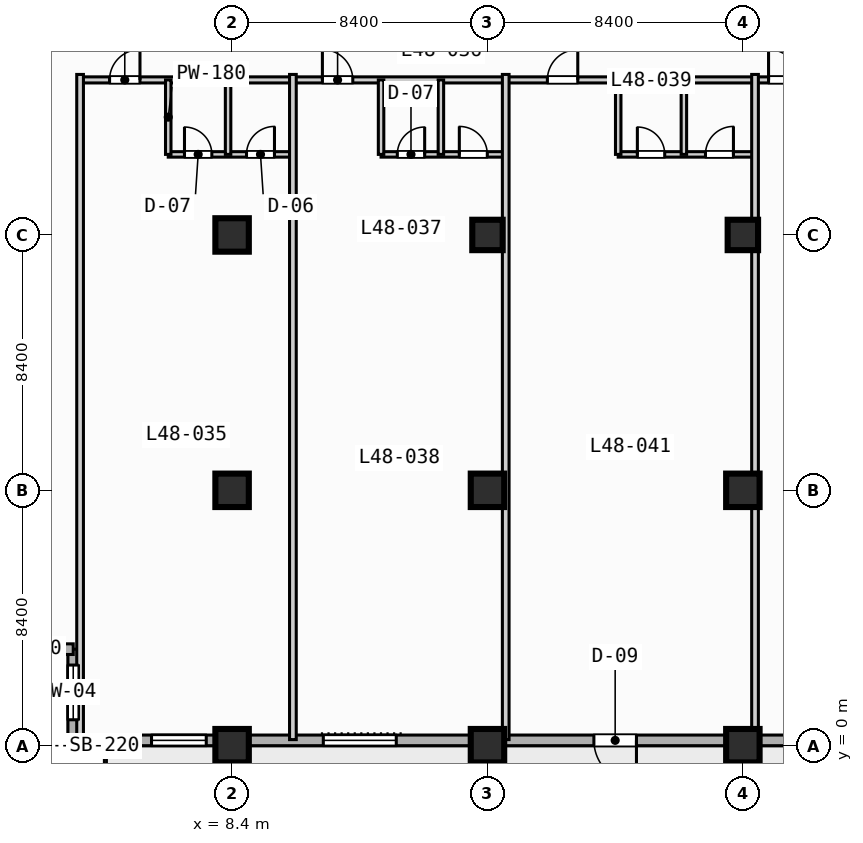
"""IFC4 building model, lengths in metres.
Left out: names, types, materials, properties, quantities, classifications, styles, units other than length and angle.
Written with IfcOpenShell. Run it as: python <this file> out.ifc"""

import sys

from ifc_helpers import new_model, si_unit, direction, frame, frame_2d, origin, origin_2d, place, context, subcontext, project, spatial, rectangle, extrude, element, fill, save


model = new_model("IFC4")
c1 = context("Model", 3, precision=1e-05, world=origin(), true_north=direction((0.0, 1.0)))
c2 = subcontext(c1, "Body", "Model", "MODEL_VIEW")
j1 = project(units=[si_unit("LENGTHUNIT", "METRE"), si_unit("PLANEANGLEUNIT", "RADIAN")], contexts=[c1])
p1 = place(None, origin())
s1 = spatial("IfcSite", under=j1, at=p1, CompositionType="ELEMENT")
p2 = place(p1, origin())
s2 = spatial("IfcBuilding", under=s1, at=p2, CompositionType="ELEMENT")
p3 = place(p2, frame((0.0, 0.0, 197.6)))
s3 = spatial("IfcBuildingStorey", under=s2, at=p3, CompositionType="ELEMENT", Elevation=197.6)
for number, where, z_axis, x_axis in (
    (1, (8.4, 0.0, 0.0), (0.0, 0.0, 1.0), (1.0, 0.0, 0.0)),
    (2, (8.4, 8.4, 0.0), (0.0, 0.0, 1.0), (1.0, 0.0, 0.0)),
    (3, (8.4, 16.8, 0.0), (0.0, 0.0, 1.0), (1.0, 0.0, 0.0)),
    (4, (16.8, 0.0, 0.0), (0.0, 0.0, 1.0), (1.0, 0.0, 0.0)),
    (5, (16.8, 8.4, 0.0), (0.0, 0.0, 1.0), (1.0, 0.0, 0.0)),
):
    element("IfcColumn", number, at=place(p3, frame(where, z_axis=z_axis, x_axis=x_axis)), inside=s3, PredefinedType="COLUMN", context=c2, shape_type="SweptSolid", body=[
        extrude(rectangle(XDim=1.1, YDim=1.1, at=origin_2d()), origin(), (0.0, 0.0, 1.0), 3.7),
    ])
p4 = place(p3, frame((16.8, 16.8, 0.0), z_axis=(0.0, 0.0, 1.0), x_axis=(1.0, 0.0, 0.0)))
e6 = element("IfcColumn", 6, at=p4, inside=s3, PredefinedType="COLUMN", context=c2, shape_type="SweptSolid", body=[
    extrude(rectangle(XDim=1.0, YDim=1.0, at=origin_2d()), origin(), (0.0, 0.0, 1.0), 3.7),
])
for number, where, z_axis, x_axis in (
    (7, (25.2, 0.0, 0.0), (0.0, 0.0, 1.0), (1.0, 0.0, 0.0)),
    (8, (25.2, 8.4, 0.0), (0.0, 0.0, 1.0), (1.0, 0.0, 0.0)),
):
    element("IfcColumn", number, at=place(p3, frame(where, z_axis=z_axis, x_axis=x_axis)), inside=s3, PredefinedType="COLUMN", context=c2, shape_type="SweptSolid", body=[
        extrude(rectangle(XDim=1.1, YDim=1.1, at=origin_2d()), origin(), (0.0, 0.0, 1.0), 3.7),
    ])
p5 = place(p3, frame((25.2, 16.8, 0.0), z_axis=(0.0, 0.0, 1.0), x_axis=(1.0, 0.0, 0.0)))
e9 = element("IfcColumn", 9, at=p5, inside=s3, PredefinedType="COLUMN", context=c2, shape_type="SweptSolid", body=[
    extrude(rectangle(XDim=1.0, YDim=1.0, at=origin_2d()), origin(), (0.0, 0.0, 1.0), 3.7),
])
p6 = place(p3, frame((3.175, 0.175, 0.0), z_axis=(0.0, 0.0, 1.0), x_axis=(0.0, 1.0, 0.0)))
e10 = element("IfcWall", 10, at=p6, inside=s3, PredefinedType="STANDARD", context=c2, shape_type="SweptSolid", body=[
    extrude(rectangle(XDim=3.0, YDim=0.35, at=frame_2d((1.5, 0.0))), origin(), (0.0, 0.0, 1.0), 3.47),
])
p7 = place(p6, frame((0.677, 0.0, 0.85)))
e11 = element("IfcOpeningElement", 11, at=p7, cuts=e10, PredefinedType="OPENING", context=c2, shape_type="SweptSolid", body=[
    extrude(rectangle(XDim=1.8, YDim=1.8, at=frame_2d((0.9, 0.9))), frame((0.0, 0.185, 0.0), z_axis=(0.0, -1.0, 0.0), x_axis=(1.0, 0.0, 0.0)), (0.0, 0.0, 1.0), 0.37),
])
p8 = place(p3, frame((3.175, 3.175, 0.0), z_axis=(0.0, 0.0, 1.0), x_axis=(-1.0, 0.0, 0.0)))
e12 = element("IfcWall", 12, at=p8, inside=s3, PredefinedType="STANDARD", context=c2, shape_type="SweptSolid", body=[
    extrude(rectangle(XDim=3.0, YDim=0.35, at=frame_2d((1.5, 0.0))), origin(), (0.0, 0.0, 1.0), 3.47),
])
p9 = place(p3, frame((72.425, 0.175, 0.0), z_axis=(0.0, 0.0, 1.0), x_axis=(-1.0, 0.0, 0.0)))
e13 = element("IfcWall", 13, at=p9, inside=s3, PredefinedType="STANDARD", context=c2, shape_type="SweptSolid", body=[
    extrude(rectangle(XDim=69.25, YDim=0.35, at=frame_2d((34.625, 0.0))), origin(), (0.0, 0.0, 1.0), 3.47),
])
p10 = place(p9, frame((50.725, 0.0, 0.0)))
e14 = element("IfcOpeningElement", 14, at=p10, cuts=e13, PredefinedType="OPENING", context=c2, shape_type="SweptSolid", body=[
    extrude(rectangle(XDim=1.4, YDim=2.2, at=frame_2d((0.7, 1.1))), frame((0.0, 0.185, 0.0), z_axis=(0.0, -1.0, 0.0), x_axis=(1.0, 0.0, 0.0)), (0.0, 0.0, 1.0), 0.37),
])
p11 = place(p9, frame((58.625, 0.0, 0.85)))
e15 = element("IfcOpeningElement", 15, at=p11, cuts=e13, PredefinedType="OPENING", context=c2, shape_type="SweptSolid", body=[
    extrude(rectangle(XDim=2.4, YDim=1.95, at=frame_2d((1.2, 0.975))), frame((0.0, 0.185, 0.0), z_axis=(0.0, -1.0, 0.0), x_axis=(1.0, 0.0, 0.0)), (0.0, 0.0, 1.0), 0.37),
])
p12 = place(p9, frame((41.825, 0.0, 0.85)))
e16 = element("IfcOpeningElement", 16, at=p12, cuts=e13, PredefinedType="OPENING", context=c2, shape_type="SweptSolid", body=[
    extrude(rectangle(XDim=2.4, YDim=1.95, at=frame_2d((1.2, 0.975))), frame((0.0, 0.185, 0.0), z_axis=(0.0, -1.0, 0.0), x_axis=(1.0, 0.0, 0.0)), (0.0, 0.0, 1.0), 0.37),
])
p13 = place(p9, frame((33.725, 0.0, 0.85)))
e17 = element("IfcOpeningElement", 17, at=p13, cuts=e13, PredefinedType="OPENING", context=c2, shape_type="SweptSolid", body=[
    extrude(rectangle(XDim=1.8, YDim=1.8, at=frame_2d((0.9, 0.9))), frame((0.0, 0.185, 0.0), z_axis=(0.0, -1.0, 0.0), x_axis=(1.0, 0.0, 0.0)), (0.0, 0.0, 1.0), 0.37),
])
p14 = place(p9, frame((25.025, 0.0, 0.85)))
e18 = element("IfcOpeningElement", 18, at=p14, cuts=e13, PredefinedType="OPENING", context=c2, shape_type="SweptSolid", body=[
    extrude(rectangle(XDim=2.4, YDim=1.95, at=frame_2d((1.2, 0.975))), frame((0.0, 0.185, 0.0), z_axis=(0.0, -1.0, 0.0), x_axis=(1.0, 0.0, 0.0)), (0.0, 0.0, 1.0), 0.37),
])
p15 = place(p9, frame((64.875, 0.0, 0.85)))
e19 = element("IfcOpeningElement", 19, at=p15, cuts=e13, PredefinedType="OPENING", context=c2, shape_type="SweptSolid", body=[
    extrude(rectangle(XDim=1.8, YDim=1.8, at=frame_2d((0.9, 0.9))), frame((0.0, 0.185, 0.0), z_axis=(0.0, -1.0, 0.0), x_axis=(1.0, 0.0, 0.0)), (0.0, 0.0, 1.0), 0.37),
])
p16 = place(p3, frame((3.4, 21.9, 0.0), z_axis=(0.0, 0.0, 1.0), x_axis=(1.0, 0.0, 0.0)))
e20 = element("IfcWall", 20, at=p16, inside=s3, PredefinedType="PARTITIONING", context=c2, shape_type="SweptSolid", body=[
    extrude(rectangle(XDim=35.8, YDim=0.2, at=frame_2d((17.9, 0.0))), origin(), (0.0, 0.0, 1.0), 3.47),
])
p17 = place(p16, frame((0.97, 0.0, 0.0)))
e21 = element("IfcOpeningElement", 21, at=p17, cuts=e20, PredefinedType="OPENING", context=c2, shape_type="SweptSolid", body=[
    extrude(rectangle(XDim=1.0, YDim=2.15, at=frame_2d((0.5, 1.075))), frame((0.0, 0.11, 0.0), z_axis=(0.0, -1.0, 0.0), x_axis=(1.0, 0.0, 0.0)), (0.0, 0.0, 1.0), 0.22),
])
p18 = place(p16, frame((7.97, 0.0, 0.0)))
e22 = element("IfcOpeningElement", 22, at=p18, cuts=e20, PredefinedType="OPENING", context=c2, shape_type="SweptSolid", body=[
    extrude(rectangle(XDim=1.0, YDim=2.15, at=frame_2d((0.5, 1.075))), frame((0.0, 0.11, 0.0), z_axis=(0.0, -1.0, 0.0), x_axis=(1.0, 0.0, 0.0)), (0.0, 0.0, 1.0), 0.22),
])
p19 = place(p16, frame((15.37, 0.0, 0.0)))
e23 = element("IfcOpeningElement", 23, at=p19, cuts=e20, PredefinedType="OPENING", context=c2, shape_type="SweptSolid", body=[
    extrude(rectangle(XDim=1.0, YDim=2.15, at=frame_2d((0.5, 1.075))), frame((0.0, 0.11, 0.0), z_axis=(0.0, -1.0, 0.0), x_axis=(1.0, 0.0, 0.0)), (0.0, 0.0, 1.0), 0.22),
])
p20 = place(p16, frame((22.645, 0.0, 0.0)))
e24 = element("IfcOpeningElement", 24, at=p20, cuts=e20, PredefinedType="OPENING", context=c2, shape_type="SweptSolid", body=[
    extrude(rectangle(XDim=1.0, YDim=2.15, at=frame_2d((0.5, 1.075))), frame((0.0, 0.11, 0.0), z_axis=(0.0, -1.0, 0.0), x_axis=(1.0, 0.0, 0.0)), (0.0, 0.0, 1.0), 0.22),
])
p21 = place(p16, frame((28.97, 0.0, 0.0)))
e25 = element("IfcOpeningElement", 25, at=p21, cuts=e20, PredefinedType="OPENING", context=c2, shape_type="SweptSolid", body=[
    extrude(rectangle(XDim=1.0, YDim=2.15, at=frame_2d((0.5, 1.075))), frame((0.0, 0.11, 0.0), z_axis=(0.0, -1.0, 0.0), x_axis=(1.0, 0.0, 0.0)), (0.0, 0.0, 1.0), 0.22),
])
p22 = place(p3, frame((3.4, 0.2, 0.0), z_axis=(0.0, 0.0, 1.0), x_axis=(0.0, 1.0, 0.0)))
e26 = element("IfcWall", 26, at=p22, inside=s3, PredefinedType="PARTITIONING", context=c2, shape_type="SweptSolid", body=[
    extrude(rectangle(XDim=21.88, YDim=0.22, at=frame_2d((10.94, 0.0))), origin(), (0.0, 0.0, 1.0), 3.47),
])
p23 = place(p3, frame((6.3, 19.45, 0.0), z_axis=(0.0, 0.0, 1.0), x_axis=(1.0, 0.0, 0.0)))
e27 = element("IfcWall", 27, at=p23, inside=s3, PredefinedType="PLUMBINGWALL", context=c2, shape_type="SweptSolid", body=[
    extrude(rectangle(XDim=4.1, YDim=0.18, at=frame_2d((2.05, 0.0))), origin(), (0.0, 0.0, 1.0), 3.47),
])
p24 = place(p23, frame((0.534, 0.0, 0.0)))
e28 = element("IfcOpeningElement", 28, at=p24, cuts=e27, PredefinedType="OPENING", context=c2, shape_type="SweptSolid", body=[
    extrude(rectangle(XDim=0.9, YDim=2.1, at=frame_2d((0.45, 1.05))), frame((0.0, 0.1, 0.0), z_axis=(0.0, -1.0, 0.0), x_axis=(1.0, 0.0, 0.0)), (0.0, 0.0, 1.0), 0.2),
])
p25 = place(p23, frame((2.574, 0.0, 0.0)))
e29 = element("IfcOpeningElement", 29, at=p25, cuts=e27, PredefinedType="OPENING", context=c2, shape_type="SweptSolid", body=[
    extrude(rectangle(XDim=0.92, YDim=2.1, at=frame_2d((0.46, 1.05))), frame((0.0, 0.1, 0.0), z_axis=(0.0, -1.0, 0.0), x_axis=(1.0, 0.0, 0.0)), (0.0, 0.0, 1.0), 0.2),
])
p26 = place(p3, frame((6.3, 19.45, 0.0), z_axis=(0.0, 0.0, 1.0), x_axis=(0.0, 1.0, 0.0)))
e30 = element("IfcWall", 30, at=p26, inside=s3, PredefinedType="PLUMBINGWALL", context=c2, shape_type="SweptSolid", body=[
    extrude(rectangle(XDim=2.45, YDim=0.18, at=frame_2d((1.225, 0.0))), origin(), (0.0, 0.0, 1.0), 3.47),
])
p27 = place(p3, frame((8.268, 19.45, 0.0), z_axis=(0.0, 0.0, 1.0), x_axis=(0.0, 1.0, 0.0)))
e31 = element("IfcWall", 31, at=p27, inside=s3, PredefinedType="PLUMBINGWALL", context=c2, shape_type="SweptSolid", body=[
    extrude(rectangle(XDim=2.45, YDim=0.18, at=frame_2d((1.225, 0.0))), origin(), (0.0, 0.0, 1.0), 2.82),
])
p28 = place(p3, frame((10.4, 0.2, 0.0), z_axis=(0.0, 0.0, 1.0), x_axis=(0.0, 1.0, 0.0)))
e32 = element("IfcWall", 32, at=p28, inside=s3, PredefinedType="PARTITIONING", context=c2, shape_type="SweptSolid", body=[
    extrude(rectangle(XDim=21.88, YDim=0.22, at=frame_2d((10.94, 0.0))), origin(), (0.0, 0.0, 1.0), 3.47),
])
p29 = place(p3, frame((13.3, 19.45, 0.0), z_axis=(0.0, 0.0, 1.0), x_axis=(1.0, 0.0, 0.0)))
e33 = element("IfcWall", 33, at=p29, inside=s3, PredefinedType="PLUMBINGWALL", context=c2, shape_type="SweptSolid", body=[
    extrude(rectangle(XDim=4.1, YDim=0.18, at=frame_2d((2.05, 0.0))), origin(), (0.0, 0.0, 1.0), 3.47),
])
p30 = place(p29, frame((0.534, 0.0, 0.0)))
e34 = element("IfcOpeningElement", 34, at=p30, cuts=e33, PredefinedType="OPENING", context=c2, shape_type="SweptSolid", body=[
    extrude(rectangle(XDim=0.9, YDim=2.1, at=frame_2d((0.45, 1.05))), frame((0.0, 0.1, 0.0), z_axis=(0.0, -1.0, 0.0), x_axis=(1.0, 0.0, 0.0)), (0.0, 0.0, 1.0), 0.2),
])
p31 = place(p29, frame((2.574, 0.0, 0.0)))
e35 = element("IfcOpeningElement", 35, at=p31, cuts=e33, PredefinedType="OPENING", context=c2, shape_type="SweptSolid", body=[
    extrude(rectangle(XDim=0.92, YDim=2.1, at=frame_2d((0.46, 1.05))), frame((0.0, 0.1, 0.0), z_axis=(0.0, -1.0, 0.0), x_axis=(1.0, 0.0, 0.0)), (0.0, 0.0, 1.0), 0.2),
])
for number, where, z_axis, x_axis in (
    (36, (13.3, 19.45, 0.0), (0.0, 0.0, 1.0), (0.0, 1.0, 0.0)),
    (37, (15.268, 19.45, 0.0), (0.0, 0.0, 1.0), (0.0, 1.0, 0.0)),
):
    element("IfcWall", number, at=place(p3, frame(where, z_axis=z_axis, x_axis=x_axis)), inside=s3, PredefinedType="PLUMBINGWALL", context=c2, shape_type="SweptSolid", body=[
        extrude(rectangle(XDim=2.45, YDim=0.18, at=frame_2d((1.225, 0.0))), origin(), (0.0, 0.0, 1.0), 3.47),
    ])
p32 = place(p3, frame((17.4, 0.2, 0.0), z_axis=(0.0, 0.0, 1.0), x_axis=(0.0, 1.0, 0.0)))
e38 = element("IfcWall", 38, at=p32, inside=s3, PredefinedType="PARTITIONING", context=c2, shape_type="SweptSolid", body=[
    extrude(rectangle(XDim=21.88, YDim=0.22, at=frame_2d((10.94, 0.0))), origin(), (0.0, 0.0, 1.0), 3.47),
])
p33 = place(p3, frame((21.1, 19.45, 0.0), z_axis=(0.0, 0.0, 1.0), x_axis=(1.0, 0.0, 0.0)))
e39 = element("IfcWall", 39, at=p33, inside=s3, PredefinedType="PLUMBINGWALL", context=c2, shape_type="SweptSolid", body=[
    extrude(rectangle(XDim=4.5, YDim=0.18, at=frame_2d((2.25, 0.0))), origin(), (0.0, 0.0, 1.0), 3.47),
])
p34 = place(p33, frame((0.63, 0.0, 0.0)))
e40 = element("IfcOpeningElement", 40, at=p34, cuts=e39, PredefinedType="OPENING", context=c2, shape_type="SweptSolid", body=[
    extrude(rectangle(XDim=0.9, YDim=2.1, at=frame_2d((0.45, 1.05))), frame((0.0, 0.1, 0.0), z_axis=(0.0, -1.0, 0.0), x_axis=(1.0, 0.0, 0.0)), (0.0, 0.0, 1.0), 0.2),
])
p35 = place(p33, frame((2.87, 0.0, 0.0)))
e41 = element("IfcOpeningElement", 41, at=p35, cuts=e39, PredefinedType="OPENING", context=c2, shape_type="SweptSolid", body=[
    extrude(rectangle(XDim=0.92, YDim=2.1, at=frame_2d((0.46, 1.05))), frame((0.0, 0.1, 0.0), z_axis=(0.0, -1.0, 0.0), x_axis=(1.0, 0.0, 0.0)), (0.0, 0.0, 1.0), 0.2),
])
for number, where, z_axis, x_axis in (
    (42, (21.1, 19.45, 0.0), (0.0, 0.0, 1.0), (0.0, 1.0, 0.0)),
    (43, (23.26, 19.45, 0.0), (0.0, 0.0, 1.0), (0.0, 1.0, 0.0)),
):
    element("IfcWall", number, at=place(p3, frame(where, z_axis=z_axis, x_axis=x_axis)), inside=s3, PredefinedType="PLUMBINGWALL", context=c2, shape_type="SweptSolid", body=[
        extrude(rectangle(XDim=2.45, YDim=0.18, at=frame_2d((1.225, 0.0))), origin(), (0.0, 0.0, 1.0), 3.47),
    ])
p36 = place(p3, frame((25.6, 0.2, 0.0), z_axis=(0.0, 0.0, 1.0), x_axis=(0.0, 1.0, 0.0)))
e44 = element("IfcWall", 44, at=p36, inside=s3, PredefinedType="PARTITIONING", context=c2, shape_type="SweptSolid", body=[
    extrude(rectangle(XDim=21.88, YDim=0.22, at=frame_2d((10.94, 0.0))), origin(), (0.0, 0.0, 1.0), 3.47),
])
p37 = place(p7, origin())
e45 = element("IfcWindow", 45, at=p37, inside=s3, PartitioningType="SINGLE_PANEL", PredefinedType="WINDOW", context=c2, shape_type="SweptSolid", body=[
    extrude(rectangle(XDim=1.8, YDim=1.8, at=frame_2d((0.9, 0.9))), frame((0.0, 0.03, 0.0), z_axis=(0.0, -1.0, 0.0), x_axis=(1.0, 0.0, 0.0)), (0.0, 0.0, 1.0), 0.06),
])
fill(e11, e45)
p38 = place(p10, origin())
e46 = element("IfcDoor", 46, at=p38, inside=s3, OperationType="SINGLE_SWING_LEFT", PredefinedType="DOOR", context=c2, shape_type="SweptSolid", body=[
    extrude(rectangle(XDim=1.4, YDim=2.2, at=frame_2d((0.7, 1.1))), frame((0.0, 0.025, 0.0), z_axis=(0.0, -1.0, 0.0), x_axis=(1.0, 0.0, 0.0)), (0.0, 0.0, 1.0), 0.05),
])
fill(e14, e46)
p39 = place(p11, origin())
e47 = element("IfcWindow", 47, at=p39, inside=s3, PartitioningType="SINGLE_PANEL", PredefinedType="WINDOW", context=c2, shape_type="SweptSolid", body=[
    extrude(rectangle(XDim=2.4, YDim=1.95, at=frame_2d((1.2, 0.975))), frame((0.0, 0.03, 0.0), z_axis=(0.0, -1.0, 0.0), x_axis=(1.0, 0.0, 0.0)), (0.0, 0.0, 1.0), 0.06),
])
fill(e15, e47)
p40 = place(p15, origin())
e48 = element("IfcWindow", 48, at=p40, inside=s3, PartitioningType="SINGLE_PANEL", PredefinedType="WINDOW", context=c2, shape_type="SweptSolid", body=[
    extrude(rectangle(XDim=1.8, YDim=1.8, at=frame_2d((0.9, 0.9))), frame((0.0, 0.03, 0.0), z_axis=(0.0, -1.0, 0.0), x_axis=(1.0, 0.0, 0.0)), (0.0, 0.0, 1.0), 0.06),
])
fill(e19, e48)
p41 = place(p17, origin())
e49 = element("IfcDoor", 49, at=p41, inside=s3, OperationType="SINGLE_SWING_RIGHT", PredefinedType="DOOR", context=c2, shape_type="SweptSolid", body=[
    extrude(rectangle(XDim=1.0, YDim=2.15, at=frame_2d((0.5, 1.075))), frame((0.0, 0.025, 0.0), z_axis=(0.0, -1.0, 0.0), x_axis=(1.0, 0.0, 0.0)), (0.0, 0.0, 1.0), 0.05),
])
fill(e21, e49)
p42 = place(p18, origin())
e50 = element("IfcDoor", 50, at=p42, inside=s3, OperationType="SINGLE_SWING_LEFT", PredefinedType="DOOR", context=c2, shape_type="SweptSolid", body=[
    extrude(rectangle(XDim=1.0, YDim=2.15, at=frame_2d((0.5, 1.075))), frame((0.0, 0.025, 0.0), z_axis=(0.0, -1.0, 0.0), x_axis=(1.0, 0.0, 0.0)), (0.0, 0.0, 1.0), 0.05),
])
fill(e22, e50)
p43 = place(p19, origin())
e51 = element("IfcDoor", 51, at=p43, inside=s3, OperationType="SINGLE_SWING_RIGHT", PredefinedType="DOOR", context=c2, shape_type="SweptSolid", body=[
    extrude(rectangle(XDim=1.0, YDim=2.15, at=frame_2d((0.5, 1.075))), frame((0.0, 0.025, 0.0), z_axis=(0.0, -1.0, 0.0), x_axis=(1.0, 0.0, 0.0)), (0.0, 0.0, 1.0), 0.05),
])
fill(e23, e51)
p44 = place(p20, origin())
e52 = element("IfcDoor", 52, at=p44, inside=s3, OperationType="SINGLE_SWING_LEFT", PredefinedType="DOOR", context=c2, shape_type="SweptSolid", body=[
    extrude(rectangle(XDim=1.0, YDim=2.15, at=frame_2d((0.5, 1.075))), frame((0.0, 0.025, 0.0), z_axis=(0.0, -1.0, 0.0), x_axis=(1.0, 0.0, 0.0)), (0.0, 0.0, 1.0), 0.05),
])
fill(e24, e52)
p45 = place(p24, origin())
e53 = element("IfcDoor", 53, at=p45, inside=s3, OperationType="SINGLE_SWING_LEFT", PredefinedType="DOOR", context=c2, shape_type="SweptSolid", body=[
    extrude(rectangle(XDim=0.9, YDim=2.1, at=frame_2d((0.45, 1.05))), frame((0.0, 0.025, 0.0), z_axis=(0.0, -1.0, 0.0), x_axis=(1.0, 0.0, 0.0)), (0.0, 0.0, 1.0), 0.05),
])
fill(e28, e53)
p46 = place(p25, origin())
e54 = element("IfcDoor", 54, at=p46, inside=s3, OperationType="SINGLE_SWING_RIGHT", PredefinedType="DOOR", context=c2, shape_type="SweptSolid", body=[
    extrude(rectangle(XDim=0.92, YDim=2.1, at=frame_2d((0.46, 1.05))), frame((0.0, 0.025, 0.0), z_axis=(0.0, -1.0, 0.0), x_axis=(1.0, 0.0, 0.0)), (0.0, 0.0, 1.0), 0.05),
])
fill(e29, e54)
p47 = place(p30, origin())
e55 = element("IfcDoor", 55, at=p47, inside=s3, OperationType="SINGLE_SWING_RIGHT", PredefinedType="DOOR", context=c2, shape_type="SweptSolid", body=[
    extrude(rectangle(XDim=0.9, YDim=2.1, at=frame_2d((0.45, 1.05))), frame((0.0, 0.025, 0.0), z_axis=(0.0, -1.0, 0.0), x_axis=(1.0, 0.0, 0.0)), (0.0, 0.0, 1.0), 0.05),
])
fill(e34, e55)
p48 = place(p31, origin())
e56 = element("IfcDoor", 56, at=p48, inside=s3, OperationType="SINGLE_SWING_LEFT", PredefinedType="DOOR", context=c2, shape_type="SweptSolid", body=[
    extrude(rectangle(XDim=0.92, YDim=2.1, at=frame_2d((0.46, 1.05))), frame((0.0, 0.025, 0.0), z_axis=(0.0, -1.0, 0.0), x_axis=(1.0, 0.0, 0.0)), (0.0, 0.0, 1.0), 0.05),
])
fill(e35, e56)
p49 = place(p34, origin())
e57 = element("IfcDoor", 57, at=p49, inside=s3, OperationType="SINGLE_SWING_LEFT", PredefinedType="DOOR", context=c2, shape_type="SweptSolid", body=[
    extrude(rectangle(XDim=0.9, YDim=2.1, at=frame_2d((0.45, 1.05))), frame((0.0, 0.025, 0.0), z_axis=(0.0, -1.0, 0.0), x_axis=(1.0, 0.0, 0.0)), (0.0, 0.0, 1.0), 0.05),
])
fill(e40, e57)
p50 = place(p35, origin())
e58 = element("IfcDoor", 58, at=p50, inside=s3, OperationType="SINGLE_SWING_RIGHT", PredefinedType="DOOR", context=c2, shape_type="SweptSolid", body=[
    extrude(rectangle(XDim=0.92, YDim=2.1, at=frame_2d((0.46, 1.05))), frame((0.0, 0.025, 0.0), z_axis=(0.0, -1.0, 0.0), x_axis=(1.0, 0.0, 0.0)), (0.0, 0.0, 1.0), 0.05),
])
fill(e41, e58)
save(model, sys.argv[1])
